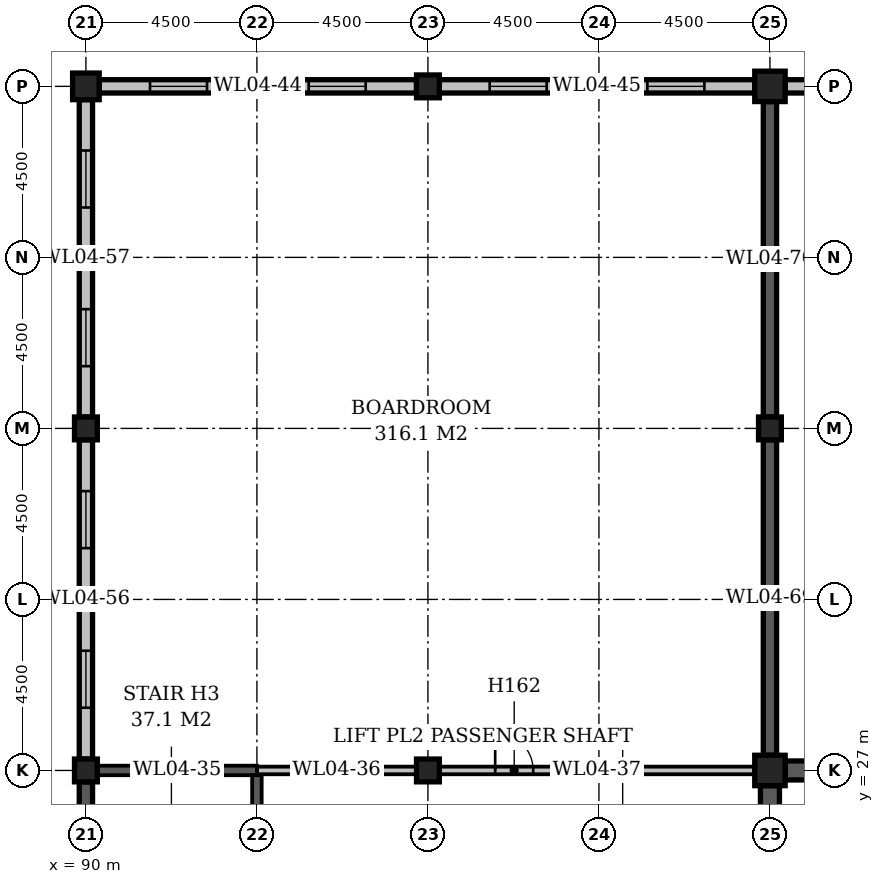
"""IFC4 building model, lengths in metres.
Left out: names, types, materials, properties, quantities, classifications, styles, units other than length and angle.
Written with IfcOpenShell. Run it as: python <this file> out.ifc"""

import sys

from ifc_helpers import new_model, si_unit, direction, frame, frame_2d, origin, origin_2d, place, context, subcontext, project, spatial, rectangle, extrude, element, fill, save


model = new_model("IFC4")
c1 = context("Model", 3, precision=1e-05, world=origin(), true_north=direction((0.0, 1.0)))
c2 = subcontext(c1, "Body", "Model", "MODEL_VIEW")
j1 = project(units=[si_unit("LENGTHUNIT", "METRE"), si_unit("PLANEANGLEUNIT", "RADIAN")], contexts=[c1])
p1 = place(None, origin())
s1 = spatial("IfcSite", under=j1, at=p1, CompositionType="ELEMENT")
p2 = place(p1, origin())
s2 = spatial("IfcBuilding", under=s1, at=p2, CompositionType="ELEMENT")
p3 = place(p2, frame((0.0, 0.0, 24.0)))
s3 = spatial("IfcBuildingStorey", under=s2, at=p3, CompositionType="ELEMENT", Elevation=24.0)
for number, where, z_axis, x_axis in (
    (1, (90.0, 27.0, 0.0), (0.0, 0.0, 1.0), (1.0, 0.0, 0.0)),
    (2, (90.0, 36.0, 0.0), (0.0, 0.0, 1.0), (1.0, 0.0, 0.0)),
):
    element("IfcColumn", number, at=place(p3, frame(where, z_axis=z_axis, x_axis=x_axis)), inside=s3, PredefinedType="COLUMN", context=c2, shape_type="SweptSolid", body=[
        extrude(rectangle(XDim=0.6, YDim=0.6, at=origin_2d()), origin(), (0.0, 0.0, 1.0), 4.7),
    ])
p4 = place(p3, frame((90.0, 45.0, 0.0), z_axis=(0.0, 0.0, 1.0), x_axis=(1.0, 0.0, 0.0)))
e3 = element("IfcColumn", 3, at=p4, inside=s3, PredefinedType="COLUMN", context=c2, shape_type="SweptSolid", body=[
    extrude(rectangle(XDim=0.7, YDim=0.7, at=origin_2d()), origin(), (0.0, 0.0, 1.0), 4.7),
])
for number, where, z_axis, x_axis in (
    (4, (99.0, 27.0, 0.0), (0.0, 0.0, 1.0), (1.0, 0.0, 0.0)),
    (5, (99.0, 45.0, 0.0), (0.0, 0.0, 1.0), (1.0, 0.0, 0.0)),
):
    element("IfcColumn", number, at=place(p3, frame(where, z_axis=z_axis, x_axis=x_axis)), inside=s3, PredefinedType="COLUMN", context=c2, shape_type="SweptSolid", body=[
        extrude(rectangle(XDim=0.6, YDim=0.6, at=origin_2d()), origin(), (0.0, 0.0, 1.0), 4.7),
    ])
p5 = place(p3, frame((108.0, 27.0, -0.3), z_axis=(0.0, 0.0, 1.0), x_axis=(1.0, 0.0, 0.0)))
e6 = element("IfcColumn", 6, at=p5, inside=s3, PredefinedType="COLUMN", context=c2, shape_type="SweptSolid", body=[
    extrude(rectangle(XDim=0.8, YDim=0.8, at=origin_2d()), origin(), (0.0, 0.0, 1.0), 5.0),
])
p6 = place(p3, frame((108.0, 36.0, -0.3), z_axis=(0.0, 0.0, 1.0), x_axis=(1.0, 0.0, 0.0)))
e7 = element("IfcColumn", 7, at=p6, inside=s3, PredefinedType="COLUMN", context=c2, shape_type="SweptSolid", body=[
    extrude(rectangle(XDim=0.6, YDim=0.6, at=origin_2d()), origin(), (0.0, 0.0, 1.0), 5.0),
])
p7 = place(p3, frame((108.0, 45.0, -0.3), z_axis=(0.0, 0.0, 1.0), x_axis=(1.0, 0.0, 0.0)))
e8 = element("IfcColumn", 8, at=p7, inside=s3, PredefinedType="COLUMN", context=c2, shape_type="SweptSolid", body=[
    extrude(rectangle(XDim=0.8, YDim=0.8, at=origin_2d()), origin(), (0.0, 0.0, 1.0), 5.0),
])
p8 = place(p3, frame((90.3, 27.0, 0.0), z_axis=(0.0, 0.0, 1.0), x_axis=(1.0, 0.0, 0.0)))
e9 = element("IfcWall", 9, at=p8, inside=s3, PredefinedType="STANDARD", context=c2, shape_type="SweptSolid", body=[
    extrude(rectangle(XDim=4.2, YDim=0.25, at=frame_2d((2.1, 0.0))), origin(), (0.0, 0.0, 1.0), 4.7),
])
p9 = place(p3, frame((94.5, 27.0, 0.0), z_axis=(0.0, 0.0, 1.0), x_axis=(1.0, 0.0, 0.0)))
e10 = element("IfcWall", 10, at=p9, inside=s3, PredefinedType="STANDARD", context=c2, shape_type="SweptSolid", body=[
    extrude(rectangle(XDim=4.2, YDim=0.2, at=frame_2d((2.1, 0.0))), origin(), (0.0, 0.0, 1.0), 4.7),
])
p10 = place(p3, frame((99.3, 27.0, 0.0), z_axis=(0.0, 0.0, 1.0), x_axis=(1.0, 0.0, 0.0)))
e11 = element("IfcWall", 11, at=p10, inside=s3, PredefinedType="STANDARD", context=c2, shape_type="SweptSolid", body=[
    extrude(rectangle(XDim=8.3, YDim=0.2, at=frame_2d((4.15, 0.0))), origin(), (0.0, 0.0, 1.0), 4.7),
])
p11 = place(p10, frame((1.47, 0.0, 0.0)))
e12 = element("IfcOpeningElement", 12, at=p11, cuts=e11, PredefinedType="OPENING", context=c2, shape_type="SweptSolid", body=[
    extrude(rectangle(XDim=1.0, YDim=2.1, at=frame_2d((0.5, 1.05))), frame((0.0, 0.112, 0.0), z_axis=(0.0, -1.0, 0.0), x_axis=(1.0, 0.0, 0.0)), (0.0, 0.0, 1.0), 0.224),
])
p12 = place(p3, frame((108.4, 27.0, 0.0), z_axis=(0.0, 0.0, 1.0), x_axis=(1.0, 0.0, 0.0)))
e13 = element("IfcWall", 13, at=p12, inside=s3, PredefinedType="STANDARD", context=c2, shape_type="SweptSolid", body=[
    extrude(rectangle(XDim=26.2, YDim=0.5, at=frame_2d((13.1, 0.0))), origin(), (0.0, 0.0, 1.0), 6.0),
])
p13 = place(p3, frame((90.35, 45.0, 0.0), z_axis=(0.0, 0.0, 1.0), x_axis=(1.0, 0.0, 0.0)))
e14 = element("IfcWall", 14, at=p13, inside=s3, PredefinedType="STANDARD", context=c2, shape_type="SweptSolid", body=[
    extrude(rectangle(XDim=8.35, YDim=0.35, at=frame_2d((4.175, 0.0))), origin(), (0.0, 0.0, 1.0), 4.1),
])
p14 = place(p13, frame((1.337, 0.0, 1.0)))
e15 = element("IfcOpeningElement", 15, at=p14, cuts=e14, PredefinedType="OPENING", context=c2, shape_type="SweptSolid", body=[
    extrude(rectangle(XDim=1.5, YDim=2.4, at=frame_2d((0.75, 1.2))), frame((0.0, 0.187, 0.0), z_axis=(0.0, -1.0, 0.0), x_axis=(1.0, 0.0, 0.0)), (0.0, 0.0, 1.0), 0.374),
])
p15 = place(p13, frame((5.512, 0.0, 1.0)))
e16 = element("IfcOpeningElement", 16, at=p15, cuts=e14, PredefinedType="OPENING", context=c2, shape_type="SweptSolid", body=[
    extrude(rectangle(XDim=1.5, YDim=2.4, at=frame_2d((0.75, 1.2))), frame((0.0, 0.187, 0.0), z_axis=(0.0, -1.0, 0.0), x_axis=(1.0, 0.0, 0.0)), (0.0, 0.0, 1.0), 0.374),
])
p16 = place(p3, frame((99.3, 45.0, 0.0), z_axis=(0.0, 0.0, 1.0), x_axis=(1.0, 0.0, 0.0)))
e17 = element("IfcWall", 17, at=p16, inside=s3, PredefinedType="STANDARD", context=c2, shape_type="SweptSolid", body=[
    extrude(rectangle(XDim=8.3, YDim=0.35, at=frame_2d((4.15, 0.0))), origin(), (0.0, 0.0, 1.0), 4.1),
])
p17 = place(p16, frame((1.325, 0.0, 1.0)))
e18 = element("IfcOpeningElement", 18, at=p17, cuts=e17, PredefinedType="OPENING", context=c2, shape_type="SweptSolid", body=[
    extrude(rectangle(XDim=1.5, YDim=2.4, at=frame_2d((0.75, 1.2))), frame((0.0, 0.187, 0.0), z_axis=(0.0, -1.0, 0.0), x_axis=(1.0, 0.0, 0.0)), (0.0, 0.0, 1.0), 0.374),
])
p18 = place(p16, frame((5.475, 0.0, 1.0)))
e19 = element("IfcOpeningElement", 19, at=p18, cuts=e17, PredefinedType="OPENING", context=c2, shape_type="SweptSolid", body=[
    extrude(rectangle(XDim=1.5, YDim=2.4, at=frame_2d((0.75, 1.2))), frame((0.0, 0.187, 0.0), z_axis=(0.0, -1.0, 0.0), x_axis=(1.0, 0.0, 0.0)), (0.0, 0.0, 1.0), 0.374),
])
p19 = place(p3, frame((108.4, 45.0, 0.0), z_axis=(0.0, 0.0, 1.0), x_axis=(1.0, 0.0, 0.0)))
e20 = element("IfcWall", 20, at=p19, inside=s3, PredefinedType="STANDARD", context=c2, shape_type="SweptSolid", body=[
    extrude(rectangle(XDim=8.3, YDim=0.35, at=frame_2d((4.15, 0.0))), origin(), (0.0, 0.0, 1.0), 6.0),
])
p20 = place(p3, frame((90.0, 18.3, 0.0), z_axis=(0.0, 0.0, 1.0), x_axis=(0.0, 1.0, 0.0)))
e21 = element("IfcWall", 21, at=p20, inside=s3, PredefinedType="STANDARD", context=c2, shape_type="SweptSolid", body=[
    extrude(rectangle(XDim=8.4, YDim=0.35, at=frame_2d((4.2, 0.0))), origin(), (0.0, 0.0, 1.0), 4.1),
])
p21 = place(p3, frame((90.0, 27.3, 0.0), z_axis=(0.0, 0.0, 1.0), x_axis=(0.0, 1.0, 0.0)))
e22 = element("IfcWall", 22, at=p21, inside=s3, PredefinedType="STANDARD", context=c2, shape_type="SweptSolid", body=[
    extrude(rectangle(XDim=8.4, YDim=0.35, at=frame_2d((4.2, 0.0))), origin(), (0.0, 0.0, 1.0), 4.1),
])
p22 = place(p21, frame((1.35, 0.0, 1.0)))
e23 = element("IfcOpeningElement", 23, at=p22, cuts=e22, PredefinedType="OPENING", context=c2, shape_type="SweptSolid", body=[
    extrude(rectangle(XDim=1.5, YDim=2.4, at=frame_2d((0.75, 1.2))), frame((0.0, 0.187, 0.0), z_axis=(0.0, -1.0, 0.0), x_axis=(1.0, 0.0, 0.0)), (0.0, 0.0, 1.0), 0.374),
])
p23 = place(p21, frame((5.55, 0.0, 1.0)))
e24 = element("IfcOpeningElement", 24, at=p23, cuts=e22, PredefinedType="OPENING", context=c2, shape_type="SweptSolid", body=[
    extrude(rectangle(XDim=1.5, YDim=2.4, at=frame_2d((0.75, 1.2))), frame((0.0, 0.187, 0.0), z_axis=(0.0, -1.0, 0.0), x_axis=(1.0, 0.0, 0.0)), (0.0, 0.0, 1.0), 0.374),
])
p24 = place(p3, frame((90.0, 36.3, 0.0), z_axis=(0.0, 0.0, 1.0), x_axis=(0.0, 1.0, 0.0)))
e25 = element("IfcWall", 25, at=p24, inside=s3, PredefinedType="STANDARD", context=c2, shape_type="SweptSolid", body=[
    extrude(rectangle(XDim=8.35, YDim=0.35, at=frame_2d((4.175, 0.0))), origin(), (0.0, 0.0, 1.0), 4.1),
])
p25 = place(p24, frame((1.337, 0.0, 1.0)))
e26 = element("IfcOpeningElement", 26, at=p25, cuts=e25, PredefinedType="OPENING", context=c2, shape_type="SweptSolid", body=[
    extrude(rectangle(XDim=1.5, YDim=2.4, at=frame_2d((0.75, 1.2))), frame((0.0, 0.187, 0.0), z_axis=(0.0, -1.0, 0.0), x_axis=(1.0, 0.0, 0.0)), (0.0, 0.0, 1.0), 0.374),
])
p26 = place(p24, frame((5.512, 0.0, 1.0)))
e27 = element("IfcOpeningElement", 27, at=p26, cuts=e25, PredefinedType="OPENING", context=c2, shape_type="SweptSolid", body=[
    extrude(rectangle(XDim=1.5, YDim=2.4, at=frame_2d((0.75, 1.2))), frame((0.0, 0.187, 0.0), z_axis=(0.0, -1.0, 0.0), x_axis=(1.0, 0.0, 0.0)), (0.0, 0.0, 1.0), 0.374),
])
p27 = place(p3, frame((94.5, 18.125, 0.0), z_axis=(0.0, 0.0, 1.0), x_axis=(0.0, 1.0, 0.0)))
e28 = element("IfcWall", 28, at=p27, inside=s3, PredefinedType="STANDARD", context=c2, shape_type="SweptSolid", body=[
    extrude(rectangle(XDim=8.75, YDim=0.25, at=frame_2d((4.375, 0.0))), origin(), (0.0, 0.0, 1.0), 4.7),
])
p28 = place(p27, frame((0.27, 0.0, 0.0)))
e29 = element("IfcOpeningElement", 29, at=p28, cuts=e28, PredefinedType="OPENING", context=c2, shape_type="SweptSolid", body=[
    extrude(rectangle(XDim=1.2, YDim=2.1, at=frame_2d((0.6, 1.05))), frame((0.0, 0.137, 0.0), z_axis=(0.0, -1.0, 0.0), x_axis=(1.0, 0.0, 0.0)), (0.0, 0.0, 1.0), 0.274),
])
p29 = place(p3, frame((108.0, 18.4, 0.0), z_axis=(0.0, 0.0, 1.0), x_axis=(0.0, 1.0, 0.0)))
e30 = element("IfcWall", 30, at=p29, inside=s3, PredefinedType="STANDARD", context=c2, shape_type="SweptSolid", body=[
    extrude(rectangle(XDim=8.2, YDim=0.5, at=frame_2d((4.1, 0.0))), origin(), (0.0, 0.0, 1.0), 4.7),
])
for number, where, z_axis, x_axis in (
    (31, (108.0, 27.4, 0.0), (0.0, 0.0, 1.0), (0.0, 1.0, 0.0)),
    (32, (108.0, 36.3, 0.0), (0.0, 0.0, 1.0), (0.0, 1.0, 0.0)),
):
    element("IfcWall", number, at=place(p3, frame(where, z_axis=z_axis, x_axis=x_axis)), inside=s3, PredefinedType="STANDARD", context=c2, shape_type="SweptSolid", body=[
        extrude(rectangle(XDim=8.3, YDim=0.35, at=frame_2d((4.15, 0.0))), origin(), (0.0, 0.0, 1.0), 6.0),
    ])
p30 = place(p3, frame((89.825, 45.05, 5.0), z_axis=(0.0, 0.0, 1.0), x_axis=(1.0, 0.0, 0.0)))
e33 = element("IfcWall", 33, at=p30, inside=s3, PredefinedType="STANDARD", context=c2, shape_type="SweptSolid", body=[
    extrude(rectangle(XDim=18.0, YDim=0.25, at=frame_2d((9.0, 0.0))), origin(), (0.0, 0.0, 1.0), 1.1),
])
p31 = place(p3, frame((89.95, -8.925, 5.0), z_axis=(0.0, 0.0, 1.0), x_axis=(0.0, 1.0, 0.0)))
e34 = element("IfcWall", 34, at=p31, inside=s3, PredefinedType="STANDARD", context=c2, shape_type="SweptSolid", body=[
    extrude(rectangle(XDim=53.85, YDim=0.25, at=frame_2d((26.925, 0.0))), origin(), (0.0, 0.0, 1.0), 1.1),
])
p32 = place(p11, origin())
e35 = element("IfcDoor", 35, at=p32, inside=s3, OperationType="SINGLE_SWING_LEFT", PredefinedType="DOOR", context=c2, shape_type="SweptSolid", body=[
    extrude(rectangle(XDim=1.0, YDim=2.1, at=frame_2d((0.5, 1.05))), frame((0.0, 0.025, 0.0), z_axis=(0.0, -1.0, 0.0), x_axis=(1.0, 0.0, 0.0)), (0.0, 0.0, 1.0), 0.05),
])
fill(e12, e35)
p33 = place(p14, origin())
e36 = element("IfcWindow", 36, at=p33, inside=s3, PartitioningType="SINGLE_PANEL", PredefinedType="WINDOW", context=c2, shape_type="SweptSolid", body=[
    extrude(rectangle(XDim=1.5, YDim=2.4, at=frame_2d((0.75, 1.2))), frame((0.0, 0.03, 0.0), z_axis=(0.0, -1.0, 0.0), x_axis=(1.0, 0.0, 0.0)), (0.0, 0.0, 1.0), 0.06),
])
fill(e15, e36)
p34 = place(p15, origin())
e37 = element("IfcWindow", 37, at=p34, inside=s3, PartitioningType="SINGLE_PANEL", PredefinedType="WINDOW", context=c2, shape_type="SweptSolid", body=[
    extrude(rectangle(XDim=1.5, YDim=2.4, at=frame_2d((0.75, 1.2))), frame((0.0, 0.03, 0.0), z_axis=(0.0, -1.0, 0.0), x_axis=(1.0, 0.0, 0.0)), (0.0, 0.0, 1.0), 0.06),
])
fill(e16, e37)
p35 = place(p17, origin())
e38 = element("IfcWindow", 38, at=p35, inside=s3, PartitioningType="SINGLE_PANEL", PredefinedType="WINDOW", context=c2, shape_type="SweptSolid", body=[
    extrude(rectangle(XDim=1.5, YDim=2.4, at=frame_2d((0.75, 1.2))), frame((0.0, 0.03, 0.0), z_axis=(0.0, -1.0, 0.0), x_axis=(1.0, 0.0, 0.0)), (0.0, 0.0, 1.0), 0.06),
])
fill(e18, e38)
p36 = place(p18, origin())
e39 = element("IfcWindow", 39, at=p36, inside=s3, PartitioningType="SINGLE_PANEL", PredefinedType="WINDOW", context=c2, shape_type="SweptSolid", body=[
    extrude(rectangle(XDim=1.5, YDim=2.4, at=frame_2d((0.75, 1.2))), frame((0.0, 0.03, 0.0), z_axis=(0.0, -1.0, 0.0), x_axis=(1.0, 0.0, 0.0)), (0.0, 0.0, 1.0), 0.06),
])
fill(e19, e39)
p37 = place(p22, origin())
e40 = element("IfcWindow", 40, at=p37, inside=s3, PartitioningType="SINGLE_PANEL", PredefinedType="WINDOW", context=c2, shape_type="SweptSolid", body=[
    extrude(rectangle(XDim=1.5, YDim=2.4, at=frame_2d((0.75, 1.2))), frame((0.0, 0.03, 0.0), z_axis=(0.0, -1.0, 0.0), x_axis=(1.0, 0.0, 0.0)), (0.0, 0.0, 1.0), 0.06),
])
fill(e23, e40)
p38 = place(p23, origin())
e41 = element("IfcWindow", 41, at=p38, inside=s3, PartitioningType="SINGLE_PANEL", PredefinedType="WINDOW", context=c2, shape_type="SweptSolid", body=[
    extrude(rectangle(XDim=1.5, YDim=2.4, at=frame_2d((0.75, 1.2))), frame((0.0, 0.03, 0.0), z_axis=(0.0, -1.0, 0.0), x_axis=(1.0, 0.0, 0.0)), (0.0, 0.0, 1.0), 0.06),
])
fill(e24, e41)
p39 = place(p25, origin())
e42 = element("IfcWindow", 42, at=p39, inside=s3, PartitioningType="SINGLE_PANEL", PredefinedType="WINDOW", context=c2, shape_type="SweptSolid", body=[
    extrude(rectangle(XDim=1.5, YDim=2.4, at=frame_2d((0.75, 1.2))), frame((0.0, 0.03, 0.0), z_axis=(0.0, -1.0, 0.0), x_axis=(1.0, 0.0, 0.0)), (0.0, 0.0, 1.0), 0.06),
])
fill(e26, e42)
p40 = place(p26, origin())
e43 = element("IfcWindow", 43, at=p40, inside=s3, PartitioningType="SINGLE_PANEL", PredefinedType="WINDOW", context=c2, shape_type="SweptSolid", body=[
    extrude(rectangle(XDim=1.5, YDim=2.4, at=frame_2d((0.75, 1.2))), frame((0.0, 0.03, 0.0), z_axis=(0.0, -1.0, 0.0), x_axis=(1.0, 0.0, 0.0)), (0.0, 0.0, 1.0), 0.06),
])
fill(e27, e43)
save(model, sys.argv[1])
